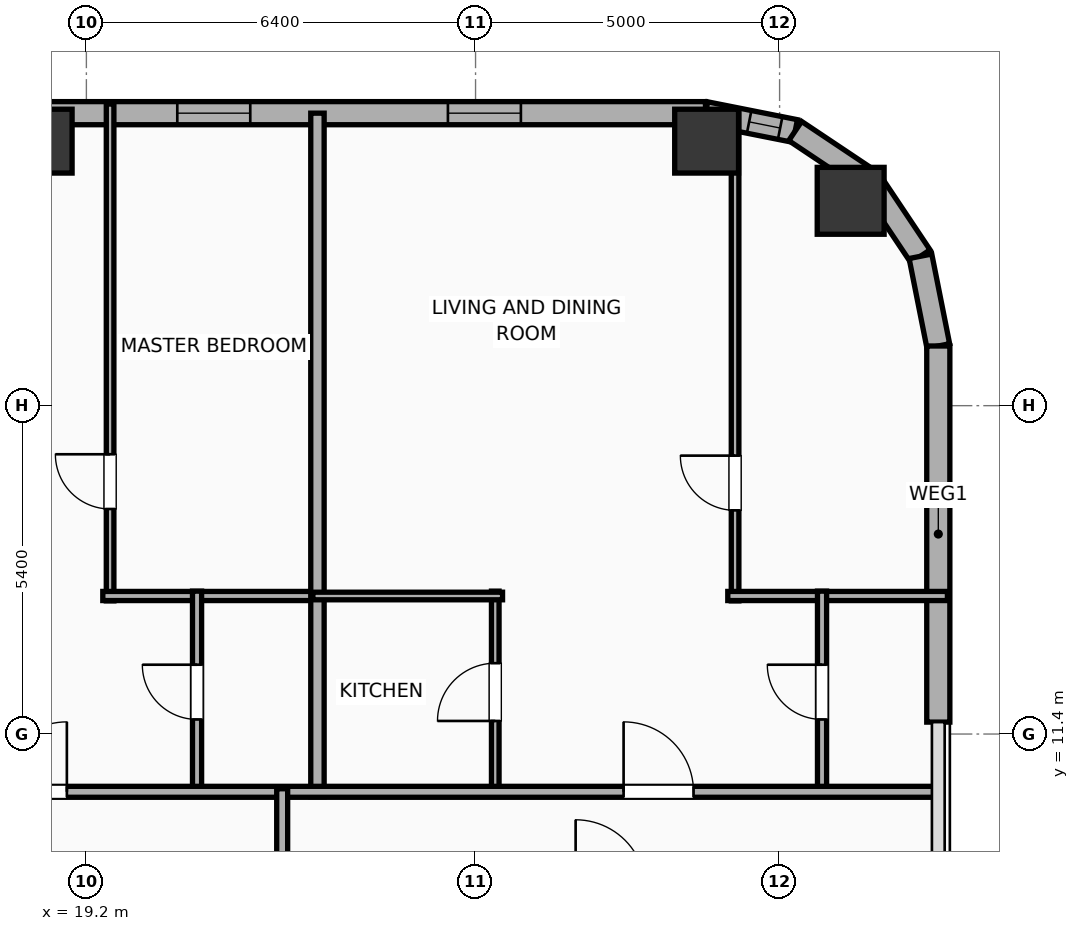
"""IFC4 building model, lengths in metres.
Left out: names, types, materials, properties, quantities, classifications, styles, units other than length and angle.
Written with IfcOpenShell. Run it as: python <this file> out.ifc"""

import sys

from ifc_helpers import new_model, si_unit, direction, frame, frame_2d, origin, origin_2d, place, context, subcontext, project, spatial, rectangle, hollow_rectangle, hollow_circle, extrude, element, fill, save


model = new_model("IFC4")
c1 = context("Model", 3, precision=1e-05, world=origin(), true_north=direction((0.0, 1.0)))
c2 = subcontext(c1, "Body", "Model", "MODEL_VIEW")
j1 = project(units=[si_unit("LENGTHUNIT", "METRE"), si_unit("PLANEANGLEUNIT", "RADIAN")], contexts=[c1])
p1 = place(None, origin())
s1 = spatial("IfcSite", under=j1, at=p1, CompositionType="ELEMENT")
p2 = place(p1, origin())
s2 = spatial("IfcBuilding", under=s1, at=p2, CompositionType="ELEMENT")
p3 = place(p2, frame((0.0, 0.0, 93.6)))
s3 = spatial("IfcBuildingStorey", under=s2, at=p3, CompositionType="ELEMENT", Elevation=93.6)
p4 = place(p3, frame((31.769, 20.169, 0.0), z_axis=(0.0, 0.0, 1.0), x_axis=(1.0, 0.0, 0.0)))
e1 = element("IfcColumn", 1, at=p4, inside=s3, PredefinedType="COLUMN", context=c2, shape_type="SweptSolid", body=[
    extrude(hollow_circle(Radius=0.55, WallThickness=0.036, at=origin_2d()), origin(), (0.0, 0.0, 1.0), 3.9),
])
for number, where, z_axis, x_axis in (
    (2, (29.4, 21.15, 0.0), (0.0, 0.0, 1.0), (1.0, 0.0, 0.0)),
    (3, (18.44, 21.15, 0.0), (0.0, 0.0, 1.0), (1.0, 0.0, 0.0)),
):
    element("IfcColumn", number, at=place(p3, frame(where, z_axis=z_axis, x_axis=x_axis)), inside=s3, PredefinedType="COLUMN", context=c2, shape_type="SweptSolid", body=[
        extrude(hollow_rectangle(XDim=1.05, YDim=1.05, WallThickness=0.036, at=origin_2d()), origin(), (0.0, 0.0, 1.0), 3.9),
    ])
p5 = place(p3, frame((-25.381, 21.61, 0.0), z_axis=(0.0, 0.0, 1.0), x_axis=(1.0, 0.0, 0.0)))
e4 = element("IfcWall", 4, at=p5, inside=s3, PredefinedType="ELEMENTEDWALL", context=c2, shape_type="SweptSolid", body=[
    extrude(rectangle(XDim=54.763, YDim=0.38, at=frame_2d((27.381, 0.0))), origin(), (0.0, 0.0, 1.0), 3.65),
])
p6 = place(p5, frame((4.795, 0.0, 0.75)))
e5 = element("IfcOpeningElement", 5, at=p6, cuts=e4, PredefinedType="OPENING", context=c2, shape_type="SweptSolid", body=[
    extrude(rectangle(XDim=2.4, YDim=2.1, at=frame_2d((1.2, 1.05))), frame((0.0, 0.2, 0.0), z_axis=(0.0, -1.0, 0.0), x_axis=(1.0, 0.0, 0.0)), (0.0, 0.0, 1.0), 0.4),
])
p7 = place(p5, frame((2.377, 0.0, 0.75)))
e6 = element("IfcOpeningElement", 6, at=p7, cuts=e4, PredefinedType="OPENING", context=c2, shape_type="SweptSolid", body=[
    extrude(rectangle(XDim=1.2, YDim=2.05, at=frame_2d((0.6, 1.025))), frame((0.0, 0.2, 0.0), z_axis=(0.0, -1.0, 0.0), x_axis=(1.0, 0.0, 0.0)), (0.0, 0.0, 1.0), 0.4),
])
p8 = place(p5, frame((11.707, 0.0, 0.75)))
e7 = element("IfcOpeningElement", 7, at=p8, cuts=e4, PredefinedType="OPENING", context=c2, shape_type="SweptSolid", body=[
    extrude(rectangle(XDim=1.2, YDim=2.05, at=frame_2d((0.6, 1.025))), frame((0.0, 0.2, 0.0), z_axis=(0.0, -1.0, 0.0), x_axis=(1.0, 0.0, 0.0)), (0.0, 0.0, 1.0), 0.4),
])
p9 = place(p5, frame((8.312, 0.0, 0.75)))
e8 = element("IfcOpeningElement", 8, at=p9, cuts=e4, PredefinedType="OPENING", context=c2, shape_type="SweptSolid", body=[
    extrude(rectangle(XDim=1.2, YDim=2.05, at=frame_2d((0.6, 1.025))), frame((0.0, 0.2, 0.0), z_axis=(0.0, -1.0, 0.0), x_axis=(1.0, 0.0, 0.0)), (0.0, 0.0, 1.0), 0.4),
])
p10 = place(p5, frame((15.476, 0.0, 0.75)))
e9 = element("IfcOpeningElement", 9, at=p10, cuts=e4, PredefinedType="OPENING", context=c2, shape_type="SweptSolid", body=[
    extrude(rectangle(XDim=1.2, YDim=2.05, at=frame_2d((0.6, 1.025))), frame((0.0, 0.2, 0.0), z_axis=(0.0, -1.0, 0.0), x_axis=(1.0, 0.0, 0.0)), (0.0, 0.0, 1.0), 0.4),
])
p11 = place(p5, frame((22.628, 0.0, 0.75)))
e10 = element("IfcOpeningElement", 10, at=p11, cuts=e4, PredefinedType="OPENING", context=c2, shape_type="SweptSolid", body=[
    extrude(rectangle(XDim=1.2, YDim=2.05, at=frame_2d((0.6, 1.025))), frame((0.0, 0.2, 0.0), z_axis=(0.0, -1.0, 0.0), x_axis=(1.0, 0.0, 0.0)), (0.0, 0.0, 1.0), 0.4),
])
p12 = place(p5, frame((18.633, 0.0, 0.75)))
e11 = element("IfcOpeningElement", 11, at=p12, cuts=e4, PredefinedType="OPENING", context=c2, shape_type="SweptSolid", body=[
    extrude(rectangle(XDim=1.2, YDim=2.05, at=frame_2d((0.6, 1.025))), frame((0.0, 0.2, 0.0), z_axis=(0.0, -1.0, 0.0), x_axis=(1.0, 0.0, 0.0)), (0.0, 0.0, 1.0), 0.4),
])
p13 = place(p5, frame((25.676, 0.0, 0.75)))
e12 = element("IfcOpeningElement", 12, at=p13, cuts=e4, PredefinedType="OPENING", context=c2, shape_type="SweptSolid", body=[
    extrude(rectangle(XDim=1.2, YDim=2.05, at=frame_2d((0.6, 1.025))), frame((0.0, 0.2, 0.0), z_axis=(0.0, -1.0, 0.0), x_axis=(1.0, 0.0, 0.0)), (0.0, 0.0, 1.0), 0.4),
])
p14 = place(p5, frame((30.881, 0.0, 0.75)))
e13 = element("IfcOpeningElement", 13, at=p14, cuts=e4, PredefinedType="OPENING", context=c2, shape_type="SweptSolid", body=[
    extrude(rectangle(XDim=1.2, YDim=2.05, at=frame_2d((0.6, 1.025))), frame((0.0, 0.2, 0.0), z_axis=(0.0, -1.0, 0.0), x_axis=(1.0, 0.0, 0.0)), (0.0, 0.0, 1.0), 0.4),
])
p15 = place(p5, frame((28.686, 0.0, 0.75)))
e14 = element("IfcOpeningElement", 14, at=p15, cuts=e4, PredefinedType="OPENING", context=c2, shape_type="SweptSolid", body=[
    extrude(rectangle(XDim=1.2, YDim=2.05, at=frame_2d((0.6, 1.025))), frame((0.0, 0.2, 0.0), z_axis=(0.0, -1.0, 0.0), x_axis=(1.0, 0.0, 0.0)), (0.0, 0.0, 1.0), 0.4),
])
p16 = place(p5, frame((35.876, 0.0, 0.75)))
e15 = element("IfcOpeningElement", 15, at=p16, cuts=e4, PredefinedType="OPENING", context=c2, shape_type="SweptSolid", body=[
    extrude(rectangle(XDim=1.2, YDim=2.05, at=frame_2d((0.6, 1.025))), frame((0.0, 0.2, 0.0), z_axis=(0.0, -1.0, 0.0), x_axis=(1.0, 0.0, 0.0)), (0.0, 0.0, 1.0), 0.4),
])
p17 = place(p5, frame((40.976, 0.0, 0.75)))
e16 = element("IfcOpeningElement", 16, at=p17, cuts=e4, PredefinedType="OPENING", context=c2, shape_type="SweptSolid", body=[
    extrude(rectangle(XDim=1.2, YDim=2.05, at=frame_2d((0.6, 1.025))), frame((0.0, 0.2, 0.0), z_axis=(0.0, -1.0, 0.0), x_axis=(1.0, 0.0, 0.0)), (0.0, 0.0, 1.0), 0.4),
])
p18 = place(p5, frame((46.076, 0.0, 0.75)))
e17 = element("IfcOpeningElement", 17, at=p18, cuts=e4, PredefinedType="OPENING", context=c2, shape_type="SweptSolid", body=[
    extrude(rectangle(XDim=1.2, YDim=2.05, at=frame_2d((0.6, 1.025))), frame((0.0, 0.2, 0.0), z_axis=(0.0, -1.0, 0.0), x_axis=(1.0, 0.0, 0.0)), (0.0, 0.0, 1.0), 0.4),
])
p19 = place(p5, frame((50.527, 0.0, 0.75)))
e18 = element("IfcOpeningElement", 18, at=p19, cuts=e4, PredefinedType="OPENING", context=c2, shape_type="SweptSolid", body=[
    extrude(rectangle(XDim=1.2, YDim=2.05, at=frame_2d((0.6, 1.025))), frame((0.0, 0.2, 0.0), z_axis=(0.0, -1.0, 0.0), x_axis=(1.0, 0.0, 0.0)), (0.0, 0.0, 1.0), 0.4),
])
p20 = place(p3, frame((29.381, 21.61, 0.0), z_axis=(0.0, 0.0, 1.0), x_axis=(0.980755066645, -0.195242155415, 0.0)))
e19 = element("IfcWall", 19, at=p20, inside=s3, PredefinedType="ELEMENTEDWALL", context=c2, shape_type="SweptSolid", body=[
    extrude(rectangle(XDim=1.504, YDim=0.38, at=frame_2d((0.752, 0.0))), origin(), (0.0, 0.0, 1.0), 3.65),
])
p21 = place(p20, frame((0.732, 0.0, 0.75)))
e20 = element("IfcOpeningElement", 20, at=p21, cuts=e19, PredefinedType="OPENING", context=c2, shape_type="SweptSolid", body=[
    extrude(rectangle(XDim=0.52, YDim=2.05, at=frame_2d((0.26, 1.025))), frame((0.0, 0.2, 0.0), z_axis=(0.0, -1.0, 0.0), x_axis=(1.0, 0.0, 0.0)), (0.0, 0.0, 1.0), 0.4),
])
p22 = place(p3, frame((30.857, 21.316, 0.0), z_axis=(0.0, 0.0, 1.0), x_axis=(0.831468045563, -0.555572577804, 0.0)))
e21 = element("IfcWall", 21, at=p22, inside=s3, PredefinedType="ELEMENTEDWALL", context=c2, shape_type="SweptSolid", body=[
    extrude(rectangle(XDim=1.485, YDim=0.38, at=frame_2d((0.742, 0.0))), origin(), (0.0, 0.0, 1.0), 3.65),
])
p23 = place(p3, frame((32.091, 20.491, 0.0), z_axis=(0.0, 0.0, 1.0), x_axis=(0.555610286119, -0.831442848281, 0.0)))
e22 = element("IfcWall", 22, at=p23, inside=s3, PredefinedType="ELEMENTEDWALL", context=c2, shape_type="SweptSolid", body=[
    extrude(rectangle(XDim=1.485, YDim=0.38, at=frame_2d((0.743, 0.0))), origin(), (0.0, 0.0, 1.0), 3.65),
])
p24 = place(p3, frame((32.917, 19.257, 0.0), z_axis=(0.0, 0.0, 1.0), x_axis=(0.195086038585, -0.980786132421, 0.0)))
e23 = element("IfcWall", 23, at=p24, inside=s3, PredefinedType="ELEMENTEDWALL", context=c2, shape_type="SweptSolid", body=[
    extrude(rectangle(XDim=1.504, YDim=0.38, at=frame_2d((0.752, 0.0))), origin(), (0.0, 0.0, 1.0), 3.65),
])
p25 = place(p3, frame((33.21, 17.781, 0.0), z_axis=(0.0, 0.0, 1.0), x_axis=(0.0, -1.0, 0.0)))
e24 = element("IfcWall", 24, at=p25, inside=s3, PredefinedType="ELEMENTEDWALL", context=c2, shape_type="SweptSolid", body=[
    extrude(rectangle(XDim=6.185, YDim=0.38, at=frame_2d((3.093, 0.0))), origin(), (0.0, 0.0, 1.0), 3.65),
])
p26 = place(p3, frame((19.59, 13.59, 0.0), z_axis=(0.0, 0.0, 1.0), x_axis=(0.0, 1.0, 0.0)))
e25 = element("IfcWall", 25, at=p26, inside=s3, PredefinedType="PARTITIONING", context=c2, shape_type="SweptSolid", body=[
    extrude(rectangle(XDim=8.17, YDim=0.125, at=frame_2d((4.085, 0.0))), origin(), (0.0, 0.0, 1.0), 3.65),
])
p27 = place(p26, frame((1.511, 0.0, 0.0)))
e26 = element("IfcOpeningElement", 26, at=p27, cuts=e25, PredefinedType="OPENING", context=c2, shape_type="SweptSolid", body=[
    extrude(rectangle(XDim=0.9, YDim=2.05, at=frame_2d((0.45, 1.025))), frame((0.0, 0.073, 0.0), z_axis=(0.0, -1.0, 0.0), x_axis=(1.0, 0.0, 0.0)), (0.0, 0.0, 1.0), 0.145),
])
p28 = place(p3, frame((19.47, 13.67, 0.0), z_axis=(0.0, 0.0, 1.0), x_axis=(1.0, 0.0, 0.0)))
e27 = element("IfcWall", 27, at=p28, inside=s3, PredefinedType="PLUMBINGWALL", context=c2, shape_type="SweptSolid", body=[
    extrude(rectangle(XDim=3.605, YDim=0.15, at=frame_2d((1.802, 0.0))), origin(), (0.0, 0.0, 1.0), 3.65),
])
p29 = place(p3, frame((21.02, 10.43, 0.0), z_axis=(0.0, 0.0, 1.0), x_axis=(0.0, 1.0, 0.0)))
e28 = element("IfcWall", 28, at=p29, inside=s3, PredefinedType="PLUMBINGWALL", context=c2, shape_type="SweptSolid", body=[
    extrude(rectangle(XDim=3.32, YDim=0.15, at=frame_2d((1.66, 0.0))), origin(), (0.0, 0.0, 1.0), 3.65),
])
p30 = place(p29, frame((1.21, 0.0, 0.0)))
e29 = element("IfcOpeningElement", 29, at=p30, cuts=e28, PredefinedType="OPENING", context=c2, shape_type="SweptSolid", body=[
    extrude(rectangle(XDim=0.9, YDim=2.05, at=frame_2d((0.45, 1.025))), frame((0.0, 0.085, 0.0), z_axis=(0.0, -1.0, 0.0), x_axis=(1.0, 0.0, 0.0)), (0.0, 0.0, 1.0), 0.17),
])
p31 = place(p3, frame((23.0, 10.37, 0.0), z_axis=(0.0, 0.0, 1.0), x_axis=(0.0, 1.0, 0.0)))
e30 = element("IfcWall", 30, at=p31, inside=s3, PredefinedType="PARTITIONING", context=c2, shape_type="SweptSolid", body=[
    extrude(rectangle(XDim=11.24, YDim=0.22, at=frame_2d((5.62, 0.0))), origin(), (0.0, 0.0, 1.0), 3.65),
])
p32 = place(p3, frame((29.868, 13.59, 0.0), z_axis=(0.0, 0.0, 1.0), x_axis=(0.0, 1.0, 0.0)))
e31 = element("IfcWall", 31, at=p32, inside=s3, PredefinedType="PARTITIONING", context=c2, shape_type="SweptSolid", body=[
    extrude(rectangle(XDim=8.076, YDim=0.125, at=frame_2d((4.038, 0.0))), origin(), (0.0, 0.0, 1.0), 3.65),
])
p33 = place(p32, frame((1.488, 0.0, 0.0)))
e32 = element("IfcOpeningElement", 32, at=p33, cuts=e31, PredefinedType="OPENING", context=c2, shape_type="SweptSolid", body=[
    extrude(rectangle(XDim=0.9, YDim=2.05, at=frame_2d((0.45, 1.025))), frame((0.0, 0.073, 0.0), z_axis=(0.0, -1.0, 0.0), x_axis=(1.0, 0.0, 0.0)), (0.0, 0.0, 1.0), 0.145),
])
p34 = place(p3, frame((29.748, 13.67, 0.0), z_axis=(0.0, 0.0, 1.0), x_axis=(1.0, 0.0, 0.0)))
e33 = element("IfcWall", 33, at=p34, inside=s3, PredefinedType="PLUMBINGWALL", context=c2, shape_type="SweptSolid", body=[
    extrude(rectangle(XDim=3.612, YDim=0.15, at=frame_2d((1.806, 0.0))), origin(), (0.0, 0.0, 1.0), 3.65),
])
p35 = place(p3, frame((25.924, 10.43, 0.0), z_axis=(0.0, 0.0, 1.0), x_axis=(0.0, 1.0, 0.0)))
e34 = element("IfcWall", 34, at=p35, inside=s3, PredefinedType="PARTITIONING", context=c2, shape_type="SweptSolid", body=[
    extrude(rectangle(XDim=3.32, YDim=0.125, at=frame_2d((1.66, 0.0))), origin(), (0.0, 0.0, 1.0), 3.65),
])
p36 = place(p35, frame((1.185, 0.0, 0.0)))
e35 = element("IfcOpeningElement", 35, at=p36, cuts=e34, PredefinedType="OPENING", context=c2, shape_type="SweptSolid", body=[
    extrude(rectangle(XDim=0.95, YDim=2.05, at=frame_2d((0.475, 1.025))), frame((0.0, 0.073, 0.0), z_axis=(0.0, -1.0, 0.0), x_axis=(1.0, 0.0, 0.0)), (0.0, 0.0, 1.0), 0.145),
])
p37 = place(p3, frame((22.925, 13.67, 0.0), z_axis=(0.0, 0.0, 1.0), x_axis=(1.0, 0.0, 0.0)))
e36 = element("IfcWall", 36, at=p37, inside=s3, PredefinedType="PARTITIONING", context=c2, shape_type="SweptSolid", body=[
    extrude(rectangle(XDim=3.119, YDim=0.125, at=frame_2d((1.56, 0.0))), origin(), (0.0, 0.0, 1.0), 3.65),
])
p38 = place(p3, frame((31.298, 10.43, 0.0), z_axis=(0.0, 0.0, 1.0), x_axis=(0.0, 1.0, 0.0)))
e37 = element("IfcWall", 37, at=p38, inside=s3, PredefinedType="PLUMBINGWALL", context=c2, shape_type="SweptSolid", body=[
    extrude(rectangle(XDim=3.32, YDim=0.15, at=frame_2d((1.66, 0.0))), origin(), (0.0, 0.0, 1.0), 3.65),
])
p39 = place(p38, frame((1.21, 0.0, 0.0)))
e38 = element("IfcOpeningElement", 38, at=p39, cuts=e37, PredefinedType="OPENING", context=c2, shape_type="SweptSolid", body=[
    extrude(rectangle(XDim=0.9, YDim=2.05, at=frame_2d((0.45, 1.025))), frame((0.0, 0.085, 0.0), z_axis=(0.0, -1.0, 0.0), x_axis=(1.0, 0.0, 0.0)), (0.0, 0.0, 1.0), 0.17),
])
p40 = place(p3, frame((-29.21, 10.45, 0.0), z_axis=(0.0, 0.0, 1.0), x_axis=(1.0, 0.0, 0.0)))
e39 = element("IfcWall", 39, at=p40, inside=s3, PredefinedType="PARTITIONING", context=c2, shape_type="SweptSolid", body=[
    extrude(rectangle(XDim=62.42, YDim=0.18, at=frame_2d((31.21, 0.0))), origin(), (0.0, 0.0, 1.0), 3.65),
])
p41 = place(p40, frame((2.534, 0.0, 0.0)))
e40 = element("IfcOpeningElement", 40, at=p41, cuts=e39, PredefinedType="OPENING", context=c2, shape_type="SweptSolid", body=[
    extrude(rectangle(XDim=0.9, YDim=2.05, at=frame_2d((0.45, 1.025))), frame((0.0, 0.1, 0.0), z_axis=(0.0, -1.0, 0.0), x_axis=(1.0, 0.0, 0.0)), (0.0, 0.0, 1.0), 0.2),
])
p42 = place(p40, frame((9.056, 0.0, 0.0)))
e41 = element("IfcOpeningElement", 41, at=p42, cuts=e39, PredefinedType="OPENING", context=c2, shape_type="SweptSolid", body=[
    extrude(rectangle(XDim=1.15, YDim=2.05, at=frame_2d((0.575, 1.025))), frame((0.0, 0.1, 0.0), z_axis=(0.0, -1.0, 0.0), x_axis=(1.0, 0.0, 0.0)), (0.0, 0.0, 1.0), 0.2),
])
p43 = place(p40, frame((16.303, 0.0, 0.0)))
e42 = element("IfcOpeningElement", 42, at=p43, cuts=e39, PredefinedType="OPENING", context=c2, shape_type="SweptSolid", body=[
    extrude(rectangle(XDim=1.15, YDim=2.05, at=frame_2d((0.575, 1.025))), frame((0.0, 0.1, 0.0), z_axis=(0.0, -1.0, 0.0), x_axis=(1.0, 0.0, 0.0)), (0.0, 0.0, 1.0), 0.2),
])
p44 = place(p40, frame((26.565, 0.0, 0.0)))
e43 = element("IfcOpeningElement", 43, at=p44, cuts=e39, PredefinedType="OPENING", context=c2, shape_type="SweptSolid", body=[
    extrude(rectangle(XDim=1.15, YDim=2.05, at=frame_2d((0.575, 1.025))), frame((0.0, 0.1, 0.0), z_axis=(0.0, -1.0, 0.0), x_axis=(1.0, 0.0, 0.0)), (0.0, 0.0, 1.0), 0.2),
])
p45 = place(p40, frame((36.677, 0.0, 0.0)))
e44 = element("IfcOpeningElement", 44, at=p45, cuts=e39, PredefinedType="OPENING", context=c2, shape_type="SweptSolid", body=[
    extrude(rectangle(XDim=1.15, YDim=2.05, at=frame_2d((0.575, 1.025))), frame((0.0, 0.1, 0.0), z_axis=(0.0, -1.0, 0.0), x_axis=(1.0, 0.0, 0.0)), (0.0, 0.0, 1.0), 0.2),
])
p46 = place(p40, frame((46.939, 0.0, 0.0)))
e45 = element("IfcOpeningElement", 45, at=p46, cuts=e39, PredefinedType="OPENING", context=c2, shape_type="SweptSolid", body=[
    extrude(rectangle(XDim=1.15, YDim=2.05, at=frame_2d((0.575, 1.025))), frame((0.0, 0.1, 0.0), z_axis=(0.0, -1.0, 0.0), x_axis=(1.0, 0.0, 0.0)), (0.0, 0.0, 1.0), 0.2),
])
p47 = place(p40, frame((57.245, 0.0, 0.0)))
e46 = element("IfcOpeningElement", 46, at=p47, cuts=e39, PredefinedType="OPENING", context=c2, shape_type="SweptSolid", body=[
    extrude(rectangle(XDim=1.15, YDim=2.05, at=frame_2d((0.575, 1.025))), frame((0.0, 0.1, 0.0), z_axis=(0.0, -1.0, 0.0), x_axis=(1.0, 0.0, 0.0)), (0.0, 0.0, 1.0), 0.2),
])
p48 = place(p3, frame((22.42, -10.5, 0.0), z_axis=(0.0, 0.0, 1.0), x_axis=(0.0, 1.0, 0.0)))
e47 = element("IfcWall", 47, at=p48, inside=s3, PredefinedType="PARTITIONING", context=c2, shape_type="SweptSolid", body=[
    extrude(rectangle(XDim=21.0, YDim=0.18, at=frame_2d((10.5, 0.0))), origin(), (0.0, 0.0, 1.0), 3.65),
])
p49 = place(p48, frame((18.205, 0.0, 0.0)))
e48 = element("IfcOpeningElement", 48, at=p49, cuts=e47, PredefinedType="OPENING", context=c2, shape_type="SweptSolid", body=[
    extrude(rectangle(XDim=0.95, YDim=2.05, at=frame_2d((0.475, 1.025))), frame((0.0, 0.1, 0.0), z_axis=(0.0, -1.0, 0.0), x_axis=(1.0, 0.0, 0.0)), (0.0, 0.0, 1.0), 0.2),
])
p50 = place(p18, origin())
e49 = element("IfcWindow", 49, at=p50, inside=s3, PartitioningType="SINGLE_PANEL", PredefinedType="WINDOW", context=c2, shape_type="SweptSolid", body=[
    extrude(rectangle(XDim=1.2, YDim=2.05, at=frame_2d((0.6, 1.025))), frame((0.0, 0.03, 0.0), z_axis=(0.0, -1.0, 0.0), x_axis=(1.0, 0.0, 0.0)), (0.0, 0.0, 1.0), 0.06),
])
fill(e17, e49)
p51 = place(p19, origin())
e50 = element("IfcWindow", 50, at=p51, inside=s3, PartitioningType="SINGLE_PANEL", PredefinedType="WINDOW", context=c2, shape_type="SweptSolid", body=[
    extrude(rectangle(XDim=1.2, YDim=2.05, at=frame_2d((0.6, 1.025))), frame((0.0, 0.03, 0.0), z_axis=(0.0, -1.0, 0.0), x_axis=(1.0, 0.0, 0.0)), (0.0, 0.0, 1.0), 0.06),
])
fill(e18, e50)
p52 = place(p21, origin())
e51 = element("IfcWindow", 51, at=p52, inside=s3, PartitioningType="SINGLE_PANEL", PredefinedType="WINDOW", context=c2, shape_type="SweptSolid", body=[
    extrude(rectangle(XDim=0.52, YDim=2.05, at=frame_2d((0.26, 1.025))), frame((0.0, 0.03, 0.0), z_axis=(0.0, -1.0, 0.0), x_axis=(1.0, 0.0, 0.0)), (0.0, 0.0, 1.0), 0.06),
])
fill(e20, e51)
p53 = place(p27, origin())
e52 = element("IfcDoor", 52, at=p53, inside=s3, OperationType="SINGLE_SWING_RIGHT", PredefinedType="DOOR", context=c2, shape_type="SweptSolid", body=[
    extrude(rectangle(XDim=0.9, YDim=2.05, at=frame_2d((0.45, 1.025))), frame((0.0, 0.025, 0.0), z_axis=(0.0, -1.0, 0.0), x_axis=(1.0, 0.0, 0.0)), (0.0, 0.0, 1.0), 0.05),
])
fill(e26, e52)
p54 = place(p30, origin())
e53 = element("IfcDoor", 53, at=p54, inside=s3, OperationType="SINGLE_SWING_RIGHT", PredefinedType="DOOR", context=c2, shape_type="SweptSolid", body=[
    extrude(rectangle(XDim=0.9, YDim=2.05, at=frame_2d((0.45, 1.025))), frame((0.0, 0.025, 0.0), z_axis=(0.0, -1.0, 0.0), x_axis=(1.0, 0.0, 0.0)), (0.0, 0.0, 1.0), 0.05),
])
fill(e29, e53)
p55 = place(p33, origin())
e54 = element("IfcDoor", 54, at=p55, inside=s3, OperationType="SINGLE_SWING_RIGHT", PredefinedType="DOOR", context=c2, shape_type="SweptSolid", body=[
    extrude(rectangle(XDim=0.9, YDim=2.05, at=frame_2d((0.45, 1.025))), frame((0.0, 0.025, 0.0), z_axis=(0.0, -1.0, 0.0), x_axis=(1.0, 0.0, 0.0)), (0.0, 0.0, 1.0), 0.05),
])
fill(e32, e54)
p56 = place(p36, origin())
e55 = element("IfcDoor", 55, at=p56, inside=s3, OperationType="SINGLE_SWING_LEFT", PredefinedType="DOOR", context=c2, shape_type="SweptSolid", body=[
    extrude(rectangle(XDim=0.95, YDim=2.05, at=frame_2d((0.475, 1.025))), frame((0.0, 0.025, 0.0), z_axis=(0.0, -1.0, 0.0), x_axis=(1.0, 0.0, 0.0)), (0.0, 0.0, 1.0), 0.05),
])
fill(e35, e55)
p57 = place(p39, origin())
e56 = element("IfcDoor", 56, at=p57, inside=s3, OperationType="SINGLE_SWING_RIGHT", PredefinedType="DOOR", context=c2, shape_type="SweptSolid", body=[
    extrude(rectangle(XDim=0.9, YDim=2.05, at=frame_2d((0.45, 1.025))), frame((0.0, 0.025, 0.0), z_axis=(0.0, -1.0, 0.0), x_axis=(1.0, 0.0, 0.0)), (0.0, 0.0, 1.0), 0.05),
])
fill(e38, e56)
p58 = place(p46, origin())
e57 = element("IfcDoor", 57, at=p58, inside=s3, OperationType="SINGLE_SWING_RIGHT", PredefinedType="DOOR", context=c2, shape_type="SweptSolid", body=[
    extrude(rectangle(XDim=1.15, YDim=2.05, at=frame_2d((0.575, 1.025))), frame((0.0, 0.025, 0.0), z_axis=(0.0, -1.0, 0.0), x_axis=(1.0, 0.0, 0.0)), (0.0, 0.0, 1.0), 0.05),
])
fill(e45, e57)
p59 = place(p47, origin())
e58 = element("IfcDoor", 58, at=p59, inside=s3, OperationType="SINGLE_SWING_LEFT", PredefinedType="DOOR", context=c2, shape_type="SweptSolid", body=[
    extrude(rectangle(XDim=1.15, YDim=2.05, at=frame_2d((0.575, 1.025))), frame((0.0, 0.025, 0.0), z_axis=(0.0, -1.0, 0.0), x_axis=(1.0, 0.0, 0.0)), (0.0, 0.0, 1.0), 0.05),
])
fill(e46, e58)
save(model, sys.argv[1])
